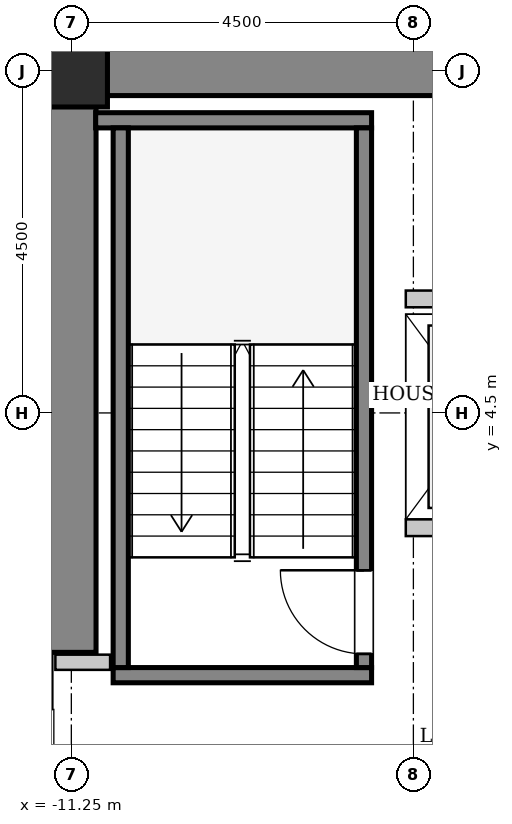
"""IFC4 building model, lengths in metres.
Left out: names, types, materials, properties, quantities, classifications, styles, units other than length and angle.
Written with IfcOpenShell. Run it as: python <this file> out.ifc"""

import sys

from ifc_helpers import new_model, si_unit, direction, frame, frame_2d, origin, origin_2d, place, context, subcontext, project, spatial, rectangle, hollow_rectangle, extrude, source, transform, mapped, element, fill, save


model = new_model("IFC4")
c1 = context("Model", 3, precision=1e-05, world=origin(), true_north=direction((0.0, 1.0)))
c2 = subcontext(c1, "Body", "Model", "MODEL_VIEW")
j1 = project(units=[si_unit("LENGTHUNIT", "METRE"), si_unit("PLANEANGLEUNIT", "RADIAN")], contexts=[c1])
p1 = place(None, origin())
s1 = spatial("IfcSite", under=j1, at=p1, CompositionType="ELEMENT")
p2 = place(p1, origin())
s2 = spatial("IfcBuilding", under=s1, at=p2, CompositionType="ELEMENT")
p3 = place(p2, frame((0.0, 0.0, 63.4)))
s3 = spatial("IfcBuildingStorey", under=s2, at=p3, CompositionType="ELEMENT", Elevation=63.4)
m1 = source(origin(), c2, "Body", "SweptSolid", [
    extrude(rectangle(XDim=10.025, YDim=0.65, at=frame_2d((5.012, 0.0))), origin(), (0.0, 0.0, 1.0), 3.8),
])
p4 = place(p3, frame((-11.575, 9.0, 0.0), z_axis=(0.0, 0.0, 1.0), x_axis=(1.0, 0.0, 0.0)))
e1 = element("IfcWall", 1, at=p4, inside=s3, PredefinedType="SHEAR", context=c2, shape_type="MappedRepresentation", body=[
    mapped(m1, transform((0.0, 0.0, 0.0), x_axis=(1.0, 0.0, 0.0), y_axis=(0.0, 1.0, 0.0), z_axis=(0.0, 0.0, 1.0), scale=1.0)),
])
m2 = source(origin(), c2, "Body", "SweptSolid", [
    extrude(rectangle(XDim=7.325, YDim=0.65, at=frame_2d((3.663, 0.0))), origin(), (0.0, 0.0, 1.0), 3.8),
])
p5 = place(p3, frame((-11.25, 1.35, 0.0), z_axis=(0.0, 0.0, 1.0), x_axis=(0.0, 1.0, 0.0)))
e2 = element("IfcWall", 2, at=p5, inside=s3, PredefinedType="SHEAR", context=c2, shape_type="MappedRepresentation", body=[
    mapped(m2, transform((0.0, 0.0, 0.0), x_axis=(1.0, 0.0, 0.0), y_axis=(0.0, 1.0, 0.0), z_axis=(0.0, 0.0, 1.0), scale=1.0)),
])
m3 = source(origin(), c2, "Body", "SweptSolid", [
    extrude(hollow_rectangle(XDim=0.95, YDim=0.95, WallThickness=0.045, InnerFilletRadius=0.045, OuterFilletRadius=0.09, at=origin_2d()), origin(), (0.0, 0.0, 1.0), 3.8),
])
p6 = place(p3, frame((-11.25, 9.0, 0.0), z_axis=(0.0, 0.0, 1.0), x_axis=(1.0, 0.0, 0.0)))
e3 = element("IfcColumn", 3, at=p6, inside=s3, PredefinedType="COLUMN", context=c2, shape_type="MappedRepresentation", body=[
    mapped(m3, transform((0.0, 0.0, 0.0), x_axis=(1.0, 0.0, 0.0), y_axis=(0.0, 1.0, 0.0), z_axis=(0.0, 0.0, 1.0), scale=1.0)),
])
m4 = source(origin(), c2, "Body", "SweptSolid", [
    extrude(rectangle(XDim=3.4, YDim=0.2, at=frame_2d((1.7, 0.0))), origin(), (0.0, 0.0, 1.0), 3.8),
])
p7 = place(p3, frame((-7.3, 1.05, 0.0), z_axis=(0.0, 0.0, 1.0), x_axis=(-1.0, 0.0, 0.0)))
e4 = element("IfcWall", 4, at=p7, inside=s3, PredefinedType="SOLIDWALL", context=c2, shape_type="MappedRepresentation", body=[
    mapped(m4, transform((0.0, 0.0, 0.0), x_axis=(1.0, 0.0, 0.0), y_axis=(0.0, 1.0, 0.0), z_axis=(0.0, 0.0, 1.0), scale=1.0)),
])
m5 = source(origin(), c2, "Body", "SweptSolid", [
    extrude(rectangle(XDim=3.63, YDim=0.2, at=frame_2d((1.815, 0.0))), origin(), (0.0, 0.0, 1.0), 3.8),
])
p8 = place(p3, frame((-7.3, 8.35, 0.0), z_axis=(0.0, 0.0, 1.0), x_axis=(-1.0, 0.0, 0.0)))
e5 = element("IfcWall", 5, at=p8, inside=s3, PredefinedType="SOLIDWALL", context=c2, shape_type="MappedRepresentation", body=[
    mapped(m5, transform((0.0, 0.0, 0.0), x_axis=(1.0, 0.0, 0.0), y_axis=(0.0, 1.0, 0.0), z_axis=(0.0, 0.0, 1.0), scale=1.0)),
])
m6 = source(origin(), c2, "Body", "SweptSolid", [
    extrude(rectangle(XDim=7.1, YDim=0.2, at=frame_2d((3.55, 0.0))), origin(), (0.0, 0.0, 1.0), 3.8),
])
p9 = place(p3, frame((-7.4, 1.15, 0.0), z_axis=(0.0, 0.0, 1.0), x_axis=(0.0, 1.0, 0.0)))
e6 = element("IfcWall", 6, at=p9, inside=s3, PredefinedType="SOLIDWALL", context=c2, shape_type="MappedRepresentation", body=[
    mapped(m6, transform((0.0, 0.0, 0.0), x_axis=(1.0, 0.0, 0.0), y_axis=(0.0, 1.0, 0.0), z_axis=(0.0, 0.0, 1.0), scale=1.0)),
])
p10 = place(p9, frame((0.18, 0.0, 0.0)))
e7 = element("IfcOpeningElement", 7, at=p10, cuts=e6, PredefinedType="OPENING", context=c2, shape_type="SweptSolid", body=[
    extrude(rectangle(XDim=1.1, YDim=2.15, at=frame_2d((0.55, 1.075))), frame((0.0, 0.11, 0.0), z_axis=(0.0, -1.0, 0.0), x_axis=(1.0, 0.0, 0.0)), (0.0, 0.0, 1.0), 0.22),
])
p11 = place(p3, frame((-10.6, 1.15, 0.0), z_axis=(0.0, 0.0, 1.0), x_axis=(0.0, 1.0, 0.0)))
e8 = element("IfcWall", 8, at=p11, inside=s3, PredefinedType="SOLIDWALL", context=c2, shape_type="MappedRepresentation", body=[
    mapped(m6, transform((0.0, 0.0, 0.0), x_axis=(1.0, 0.0, 0.0), y_axis=(0.0, 1.0, 0.0), z_axis=(0.0, 0.0, 1.0), scale=1.0)),
])
m7 = source(origin(), c2, "Body", "SweptSolid", [
    extrude(rectangle(XDim=2.0, YDim=0.22, at=frame_2d((1.0, 0.0))), origin(), (0.0, 0.0, 1.0), 3.535),
])
p12 = place(p3, frame((-6.85, 2.99, 0.0), z_axis=(0.0, 0.0, 1.0), x_axis=(1.0, 0.0, 0.0)))
e9 = element("IfcWall", 9, at=p12, inside=s3, PredefinedType="SOLIDWALL", context=c2, shape_type="MappedRepresentation", body=[
    mapped(m7, transform((0.0, 0.0, 0.0), x_axis=(1.0, 0.0, 0.0), y_axis=(0.0, 1.0, 0.0), z_axis=(0.0, 0.0, 1.0), scale=1.0)),
])
p13 = place(p12, frame((0.4, 0.0, 0.0)))
e10 = element("IfcOpeningElement", 10, at=p13, cuts=e9, PredefinedType="OPENING", context=c2, shape_type="SweptSolid", body=[
    extrude(rectangle(XDim=1.2, YDim=2.2, at=frame_2d((0.6, 1.1))), frame((0.0, 0.12, 0.0), z_axis=(0.0, -1.0, 0.0), x_axis=(1.0, 0.0, 0.0)), (0.0, 0.0, 1.0), 0.24),
])
m8 = source(origin(), c2, "Body", "SweptSolid", [
    extrude(rectangle(XDim=2.095, YDim=0.22, at=frame_2d((1.048, 0.0))), origin(), (0.0, 0.0, 1.0), 3.535),
])
p14 = place(p3, frame((-6.85, 6.0, 0.0), z_axis=(0.0, 0.0, 1.0), x_axis=(1.0, 0.0, 0.0)))
e11 = element("IfcWall", 11, at=p14, inside=s3, PredefinedType="SOLIDWALL", context=c2, shape_type="MappedRepresentation", body=[
    mapped(m8, transform((0.0, 0.0, 0.0), x_axis=(1.0, 0.0, 0.0), y_axis=(0.0, 1.0, 0.0), z_axis=(0.0, 0.0, 1.0), scale=1.0)),
])
m9 = source(origin(), c2, "Body", "SweptSolid", [
    extrude(rectangle(XDim=0.72, YDim=0.2, at=frame_2d((0.36, 0.0))), origin(), (0.0, 0.0, 1.0), 3.535),
])
p15 = place(p3, frame((-11.46, 1.22, 0.0), z_axis=(0.0, 0.0, 1.0), x_axis=(1.0, 0.0, 0.0)))
e12 = element("IfcWall", 12, at=p15, inside=s3, PredefinedType="PARTITIONING", context=c2, shape_type="MappedRepresentation", body=[
    mapped(m9, transform((0.0, 0.0, 0.0), x_axis=(1.0, 0.0, 0.0), y_axis=(0.0, 1.0, 0.0), z_axis=(0.0, 0.0, 1.0), scale=1.0)),
])
m10 = source(origin(), c2, "Body", "SweptSolid", [
    extrude(rectangle(XDim=1.1, YDim=2.15, at=frame_2d((0.55, 1.075))), frame((0.0, 0.025, 0.0), z_axis=(0.0, -1.0, 0.0), x_axis=(1.0, 0.0, 0.0)), (0.0, 0.0, 1.0), 0.05),
])
p16 = place(p10, origin())
e13 = element("IfcDoor", 13, at=p16, inside=s3, OperationType="SINGLE_SWING_RIGHT", PredefinedType="DOOR", context=c2, shape_type="MappedRepresentation", body=[
    mapped(m10, transform((0.0, 0.0, 0.0), x_axis=(1.0, 0.0, 0.0), y_axis=(0.0, 1.0, 0.0), z_axis=(0.0, 0.0, 1.0), scale=1.0)),
])
fill(e7, e13)
save(model, sys.argv[1])
